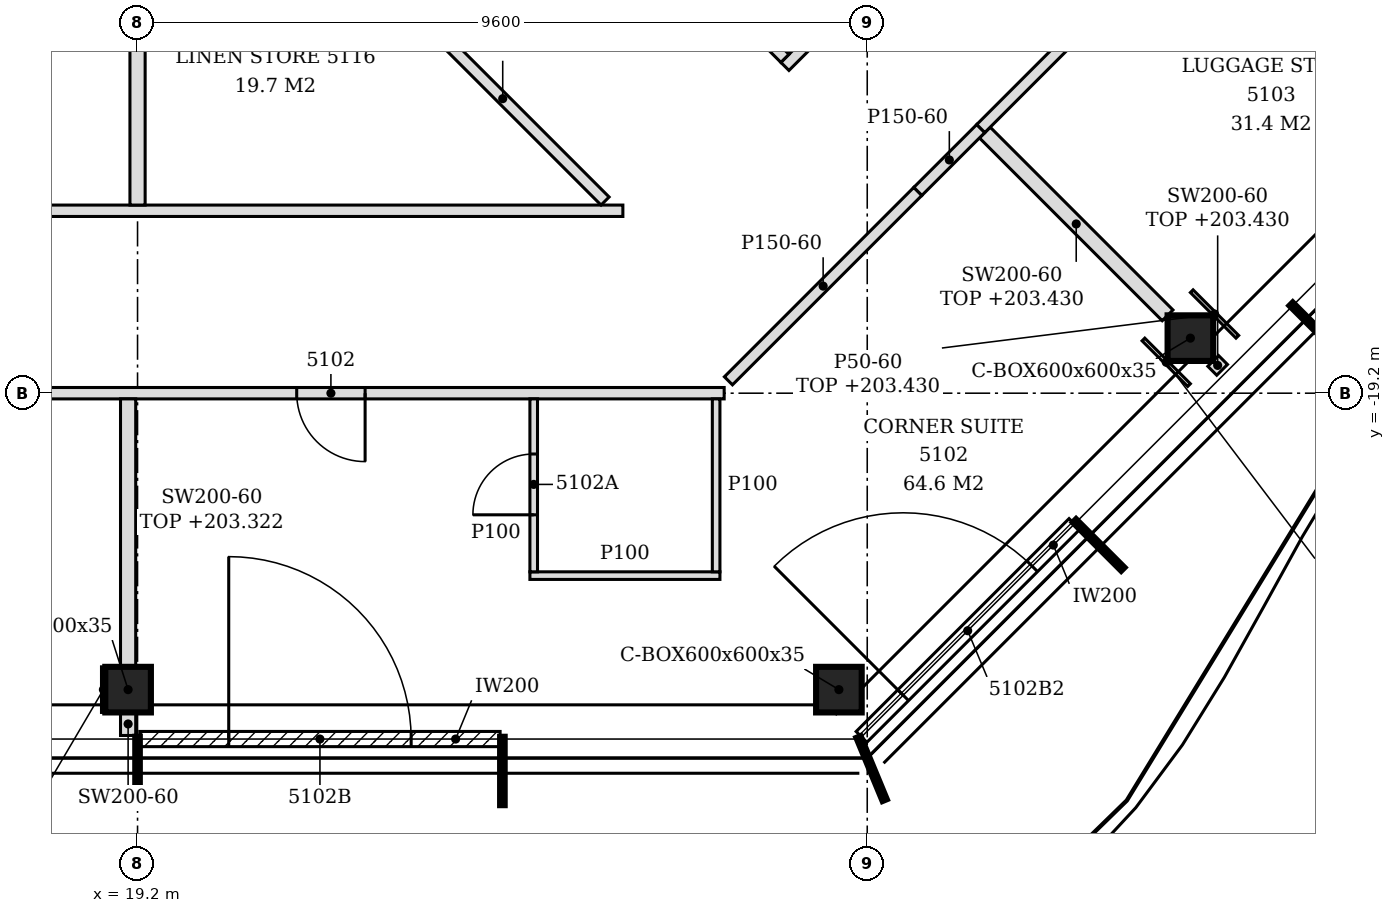
"""IFC4 building model, lengths in metres.
Left out: names, types, materials, properties, quantities, classifications, styles, units other than length and angle.
Written with IfcOpenShell. Run it as: python <this file> out.ifc"""

import sys

from ifc_helpers import new_model, si_unit, direction, frame, frame_2d, origin, origin_2d, place, context, subcontext, project, spatial, polyline, rectangle, hollow_rectangle, outline, extrude, clip, halfspace, element, fill, save


model = new_model("IFC4")
c1 = context("Model", 3, precision=1e-05, world=origin(), true_north=direction((0.0, 1.0)))
c2 = subcontext(c1, "Body", "Model", "MODEL_VIEW")
j1 = project(units=[si_unit("LENGTHUNIT", "METRE"), si_unit("PLANEANGLEUNIT", "RADIAN")], contexts=[c1])
p1 = place(None, origin())
s1 = spatial("IfcSite", under=j1, at=p1, CompositionType="ELEMENT")
p2 = place(p1, origin())
s2 = spatial("IfcBuilding", under=s1, at=p2, CompositionType="ELEMENT")
p3 = place(p2, frame((0.0, 0.0, 201.0)))
s3 = spatial("IfcBuildingStorey", under=s2, at=p3, CompositionType="ELEMENT", Elevation=201.0)
for number, where, z_axis, x_axis in (
    (1, (19.076, -23.1, -0.15), (0.0, 0.0, 1.0), (1.0, 0.0, 0.0)),
    (2, (28.427, -23.1, -0.15), (0.0, 0.0, 1.0), (1.0, 0.0, 0.0)),
    (3, (33.052, -18.476, -0.15), (0.0, 0.0, 1.0), (1.0, 0.0, 0.0)),
):
    element("IfcColumn", number, at=place(p3, frame(where, z_axis=z_axis, x_axis=x_axis)), inside=s3, PredefinedType="COLUMN", context=c2, shape_type="Clipping", body=[
        clip(clip(extrude(hollow_rectangle(XDim=0.6, YDim=0.6, WallThickness=0.035, at=origin_2d()), origin(), (0.0, 0.0, 1.0), 3.5), halfspace(frame((0.0, 0.0, 0.011), z_axis=(0.0, 0.0, 1.0), x_axis=(1.0, 0.0, 0.0)), True)), halfspace(frame((0.0, 0.0, 3.095), z_axis=(0.0, 0.0, 1.0), x_axis=(1.0, 0.0, 0.0)), False)),
    ])
p4 = place(p3, frame((19.23, -23.75, 0.0), z_axis=(0.0, 0.0, 1.0), x_axis=(1.0, 0.0, 0.0)))
e4 = element("IfcWall", 4, at=p4, inside=s3, PredefinedType="NOTDEFINED", context=c2, shape_type="SweptSolid", body=[
    extrude(rectangle(XDim=4.74, YDim=0.2, at=frame_2d((2.37, 0.0))), origin(), (0.0, 0.0, 1.0), 3.35),
])
p5 = place(p4, frame((1.17, 0.0, 0.0)))
e5 = element("IfcOpeningElement", 5, at=p5, cuts=e4, PredefinedType="OPENING", context=c2, shape_type="SweptSolid", body=[
    extrude(rectangle(XDim=2.4, YDim=2.4, at=frame_2d((1.2, 1.2))), frame((0.0, 0.11, 0.0), z_axis=(0.0, -1.0, 0.0), x_axis=(1.0, 0.0, 0.0)), (0.0, 0.0, 1.0), 0.22),
])
p6 = place(p3, frame((28.725, -23.722, 0.0), z_axis=(0.0, 0.0, 1.0), x_axis=(0.707106781187, 0.707106781187, 0.0)))
e6 = element("IfcWall", 6, at=p6, inside=s3, PredefinedType="NOTDEFINED", context=c2, shape_type="SweptSolid", body=[
    extrude(rectangle(XDim=3.962, YDim=0.2, at=frame_2d((1.981, 0.0))), origin(), (0.0, 0.0, 1.0), 3.35),
])
p7 = place(p6, frame((0.775, 0.0, 0.0)))
e7 = element("IfcOpeningElement", 7, at=p7, cuts=e6, PredefinedType="OPENING", context=c2, shape_type="SweptSolid", body=[
    extrude(rectangle(XDim=2.4, YDim=2.4, at=frame_2d((1.2, 1.2))), frame((0.0, 0.11, 0.0), z_axis=(0.0, -1.0, 0.0), x_axis=(1.0, 0.0, 0.0)), (0.0, 0.0, 1.0), 0.22),
])
p8 = place(p3, frame((19.076, -23.703, 0.0), z_axis=(0.0, 0.0, 1.0), x_axis=(0.0, 1.0, 0.0)))
e8 = element("IfcWall", 8, at=p8, inside=s3, PredefinedType="PARTITIONING", context=c2, shape_type="SweptSolid", body=[
    extrude(outline(polyline([(0.0, 0.0), (0.303, 0.0), (0.303, 2.43), (0.153, 2.43), (0.151, 3.35), (0.0, 3.35), (0.0, 0.0)])), frame((0.0, 0.1, 0.0), z_axis=(0.0, -1.0, 0.0), x_axis=(1.0, 0.0, 0.0)), (0.0, 0.0, 1.0), 0.2),
])
p9 = place(p3, frame((19.076, -22.8, 0.0), z_axis=(0.0, 0.0, 1.0), x_axis=(0.0, 1.0, 0.0)))
e9 = element("IfcWall", 9, at=p9, inside=s3, PredefinedType="PARTITIONING", context=c2, shape_type="SweptSolid", body=[
    extrude(rectangle(XDim=3.525, YDim=0.2, at=frame_2d((1.763, 0.0))), origin(), (0.0, 0.0, 1.0), 2.322),
])
p10 = place(p3, frame((24.362, -21.6, 0.0), z_axis=(0.0, 0.0, 1.0), x_axis=(1.0, 0.0, 0.0)))
e10 = element("IfcWall", 10, at=p10, inside=s3, PredefinedType="PARTITIONING", context=c2, shape_type="SweptSolid", body=[
    extrude(rectangle(XDim=2.5, YDim=0.1, at=frame_2d((1.25, 0.0))), origin(), (0.0, 0.0, 1.0), 3.35),
])
p11 = place(p3, frame((24.412, -21.55, 0.0), z_axis=(0.0, 0.0, 1.0), x_axis=(0.0, 1.0, 0.0)))
e11 = element("IfcWall", 11, at=p11, inside=s3, PredefinedType="PARTITIONING", context=c2, shape_type="SweptSolid", body=[
    extrude(outline(polyline([(0.0, 0.0), (2.275, 0.0), (2.275, 2.78), (2.245, 2.78), (2.243, 3.35), (0.0, 3.35), (0.0, 0.0)])), frame((0.0, 0.05, 0.0), z_axis=(0.0, -1.0, 0.0), x_axis=(1.0, 0.0, 0.0)), (0.0, 0.0, 1.0), 0.1),
])
p12 = place(p11, frame((0.75, 0.0, 0.0)))
e12 = element("IfcOpeningElement", 12, at=p12, cuts=e11, PredefinedType="OPENING", context=c2, shape_type="SweptSolid", body=[
    extrude(rectangle(XDim=0.8, YDim=2.1, at=frame_2d((0.4, 1.05))), frame((0.0, 0.06, 0.0), z_axis=(0.0, -1.0, 0.0), x_axis=(1.0, 0.0, 0.0)), (0.0, 0.0, 1.0), 0.12),
])
p13 = place(p3, frame((26.812, -21.55, 0.0), z_axis=(0.0, 0.0, 1.0), x_axis=(0.0, 1.0, 0.0)))
e13 = element("IfcWall", 13, at=p13, inside=s3, PredefinedType="PARTITIONING", context=c2, shape_type="SweptSolid", body=[
    extrude(outline(polyline([(0.0, 0.0), (2.275, 0.0), (2.275, 2.78), (2.245, 2.78), (2.243, 3.35), (0.0, 3.35), (0.0, 0.0)])), frame((0.0, 0.05, 0.0), z_axis=(0.0, -1.0, 0.0), x_axis=(1.0, 0.0, 0.0)), (0.0, 0.0, 1.0), 0.1),
])
p14 = place(p3, frame((2.5, -19.2, 0.0), z_axis=(0.0, 0.0, 1.0), x_axis=(1.0, 0.0, 0.0)))
e14 = element("IfcWall", 14, at=p14, inside=s3, PredefinedType="PARTITIONING", context=c2, shape_type="SweptSolid", body=[
    extrude(outline(polyline([(0.0, 0.0), (24.418, 0.0), (24.418, 2.78), (16.851, 2.78), (16.849, 2.322), (16.549, 2.322), (16.547, 2.78), (4.85, 2.78), (4.848, 2.63), (4.55, 2.63), (4.548, 2.78), (0.0, 2.78), (0.0, 0.0)])), frame((0.0, 0.075, 0.0), z_axis=(0.0, -1.0, 0.0), x_axis=(1.0, 0.0, 0.0)), (0.0, 0.0, 1.0), 0.15),
])
p15 = place(p14, frame((11.45, 0.0, 0.0)))
e15 = element("IfcOpeningElement", 15, at=p15, cuts=e14, PredefinedType="OPENING", context=c2, shape_type="SweptSolid", body=[
    extrude(rectangle(XDim=0.9, YDim=2.1, at=frame_2d((0.45, 1.05))), frame((0.0, 0.085, 0.0), z_axis=(0.0, -1.0, 0.0), x_axis=(1.0, 0.0, 0.0)), (0.0, 0.0, 1.0), 0.17),
])
p16 = place(p14, frame((18.794, 0.0, 0.0)))
e16 = element("IfcOpeningElement", 16, at=p16, cuts=e14, PredefinedType="OPENING", context=c2, shape_type="SweptSolid", body=[
    extrude(rectangle(XDim=0.9, YDim=2.1, at=frame_2d((0.45, 1.05))), frame((0.0, 0.085, 0.0), z_axis=(0.0, -1.0, 0.0), x_axis=(1.0, 0.0, 0.0)), (0.0, 0.0, 1.0), 0.17),
])
p17 = place(p3, frame((26.974, -19.037, 0.0), z_axis=(0.0, 0.0, 1.0), x_axis=(0.707106781187, 0.707106781187, 0.0)))
e17 = element("IfcWall", 17, at=p17, inside=s3, PredefinedType="PARTITIONING", context=c2, shape_type="SweptSolid", body=[
    extrude(rectangle(XDim=3.524, YDim=0.15, at=frame_2d((1.762, 0.0))), origin(), (0.0, 0.0, 1.0), 3.35),
])
p18 = place(p3, frame((33.469, -18.893, 0.0), z_axis=(0.0, 0.0, 1.0), x_axis=(-0.707106781187, 0.707106781187, 0.0)))
e18 = element("IfcWall", 18, at=p18, inside=s3, PredefinedType="PARTITIONING", context=c2, shape_type="SweptSolid", body=[
    extrude(rectangle(XDim=0.166, YDim=0.2, at=frame_2d((0.083, 0.0))), origin(), (0.0, 0.0, 1.0), 2.43),
])
p19 = place(p3, frame((32.752, -18.176, 0.0), z_axis=(0.0, 0.0, 1.0), x_axis=(-0.707106781187, 0.707106781187, 0.0)))
e19 = element("IfcWall", 19, at=p19, inside=s3, PredefinedType="PARTITIONING", context=c2, shape_type="SweptSolid", body=[
    extrude(rectangle(XDim=3.401, YDim=0.2, at=frame_2d((1.7, 0.0))), origin(), (0.0, 0.0, 1.0), 2.43),
])
p20 = place(p3, frame((7.125, -16.8, 0.0), z_axis=(0.0, 0.0, 1.0), x_axis=(1.0, 0.0, 0.0)))
e20 = element("IfcWall", 20, at=p20, inside=s3, PredefinedType="PARTITIONING", context=c2, shape_type="SweptSolid", body=[
    extrude(outline(polyline([(0.0, 0.0), (18.46, 0.0), (18.46, 3.35), (12.226, 3.35), (12.224, 2.322), (11.924, 2.322), (11.922, 3.35), (0.225, 3.35), (0.223, 2.63), (0.0, 2.63), (0.0, 0.0)])), frame((0.0, 0.075, 0.0), z_axis=(0.0, -1.0, 0.0), x_axis=(1.0, 0.0, 0.0)), (0.0, 0.0, 1.0), 0.15),
])
p21 = place(p3, frame((19.2, -16.725, 0.0), z_axis=(0.0, 0.0, 1.0), x_axis=(0.0, 1.0, 0.0)))
e21 = element("IfcWall", 21, at=p21, inside=s3, PredefinedType="PARTITIONING", context=c2, shape_type="SweptSolid", body=[
    extrude(rectangle(XDim=6.321, YDim=0.2, at=frame_2d((3.16, 0.0))), origin(), (0.0, 0.0, 1.0), 2.322),
])
p22 = place(p3, frame((25.351, -16.672, 0.0), z_axis=(0.0, 0.0, 1.0), x_axis=(-0.707106781187, 0.707106781187, 0.0)))
e22 = element("IfcWall", 22, at=p22, inside=s3, PredefinedType="PARTITIONING", context=c2, shape_type="SweptSolid", body=[
    extrude(rectangle(XDim=8.482, YDim=0.15, at=frame_2d((4.241, 0.0))), origin(), (0.0, 0.0, 1.0), 2.322),
])
p23 = place(p22, frame((3.809, 0.0, 0.0)))
e23 = element("IfcOpeningElement", 23, at=p23, cuts=e22, PredefinedType="OPENING", context=c2, shape_type="SweptSolid", body=[
    extrude(rectangle(XDim=0.9, YDim=2.1, at=frame_2d((0.45, 1.05))), frame((0.0, 0.085, 0.0), z_axis=(0.0, -1.0, 0.0), x_axis=(1.0, 0.0, 0.0)), (0.0, 0.0, 1.0), 0.17),
])
p24 = place(p3, frame((29.466, -16.545, 0.0), z_axis=(0.0, 0.0, 1.0), x_axis=(0.70752395322, 0.706689362889, 0.0)))
e24 = element("IfcWall", 24, at=p24, inside=s3, PredefinedType="PARTITIONING", context=c2, shape_type="SweptSolid", body=[
    extrude(rectangle(XDim=1.17, YDim=0.15, at=frame_2d((0.585, 0.0))), origin(), (0.0, 0.0, 1.0), 3.35),
])
p25 = place(p3, frame((30.294, -15.718, 0.0), z_axis=(0.0, 0.0, 1.0), x_axis=(0.707117331948, 0.707096230267, 0.0)))
e25 = element("IfcWall", 25, at=p25, inside=s3, PredefinedType="PARTITIONING", context=c2, shape_type="SweptSolid", body=[
    extrude(rectangle(XDim=11.57, YDim=0.15, at=frame_2d((5.785, 0.0))), origin(), (0.0, 0.0, 1.0), 2.43),
])
p26 = place(p25, frame((2.819, 0.0, 0.0)))
e26 = element("IfcOpeningElement", 26, at=p26, cuts=e25, PredefinedType="OPENING", context=c2, shape_type="SweptSolid", body=[
    extrude(rectangle(XDim=0.9, YDim=2.1, at=frame_2d((0.45, 1.05))), frame((0.0, 0.085, 0.0), z_axis=(0.0, -1.0, 0.0), x_axis=(1.0, 0.0, 0.0)), (0.0, 0.0, 1.0), 0.17),
])
p27 = place(p3, frame((27.717, -14.901, 0.0), z_axis=(0.0, 0.0, 1.0), x_axis=(0.707106781187, 0.707106781187, 0.0)))
e27 = element("IfcWall", 27, at=p27, inside=s3, PredefinedType="PARTITIONING", context=c2, shape_type="SweptSolid", body=[
    extrude(rectangle(XDim=5.031, YDim=0.15, at=frame_2d((2.516, 0.0))), origin(), (0.0, 0.0, 1.0), 2.73),
])
p28 = place(p3, frame((27.717, -14.795, 0.0), z_axis=(0.0, 0.0, 1.0), x_axis=(-0.707175638903, 0.707037916764, 0.0)))
e28 = element("IfcWall", 28, at=p28, inside=s3, PredefinedType="PARTITIONING", context=c2, shape_type="SweptSolid", body=[
    extrude(rectangle(XDim=8.864, YDim=0.15, at=frame_2d((4.432, 0.0))), origin(), (0.0, 0.0, 1.0), 2.43),
])
p29 = place(p3, frame((18.751, -23.4, 0.0), z_axis=(0.0, 0.0, 1.0), x_axis=(0.0, 1.0, 0.0)))
e29 = element("IfcWall", 29, at=p29, inside=s3, PredefinedType="PARTITIONING", context=c2, shape_type="SweptSolid", body=[
    extrude(rectangle(XDim=0.6, YDim=0.05, at=frame_2d((0.3, 0.0))), origin(), (0.0, 0.0, 1.0), 2.43),
])
p30 = place(p3, frame((33.034, -19.094, 0.0), z_axis=(0.0, 0.0, 1.0), x_axis=(-0.706962899457, 0.707250633645, 0.0)))
e30 = element("IfcWall", 30, at=p30, inside=s3, PredefinedType="PARTITIONING", context=c2, shape_type="SweptSolid", body=[
    extrude(rectangle(XDim=0.848, YDim=0.05, at=frame_2d((0.424, 0.0))), origin(), (0.0, 0.0, 1.0), 2.43),
])
p31 = place(p3, frame((33.669, -18.458, 0.0), z_axis=(0.0, 0.0, 1.0), x_axis=(-0.707106781187, 0.707106781187, 0.0)))
e31 = element("IfcWall", 31, at=p31, inside=s3, PredefinedType="PARTITIONING", context=c2, shape_type="SweptSolid", body=[
    extrude(rectangle(XDim=0.849, YDim=0.05, at=frame_2d((0.424, 0.0))), origin(), (0.0, 0.0, 1.0), 2.43),
])
p32 = place(p5, origin())
e32 = element("IfcDoor", 32, at=p32, inside=s3, OperationType="SINGLE_SWING_LEFT", PredefinedType="DOOR", context=c2, shape_type="SweptSolid", body=[
    extrude(rectangle(XDim=2.4, YDim=2.4, at=frame_2d((1.2, 1.2))), frame((0.0, 0.025, 0.0), z_axis=(0.0, -1.0, 0.0), x_axis=(1.0, 0.0, 0.0)), (0.0, 0.0, 1.0), 0.05),
])
fill(e5, e32)
p33 = place(p7, origin())
e33 = element("IfcDoor", 33, at=p33, inside=s3, OperationType="SINGLE_SWING_LEFT", PredefinedType="DOOR", context=c2, shape_type="SweptSolid", body=[
    extrude(rectangle(XDim=2.4, YDim=2.4, at=frame_2d((1.2, 1.2))), frame((0.0, 0.025, 0.0), z_axis=(0.0, -1.0, 0.0), x_axis=(1.0, 0.0, 0.0)), (0.0, 0.0, 1.0), 0.05),
])
fill(e7, e33)
p34 = place(p16, frame((0.9, 0.0, 0.0), z_axis=(0.0, 0.0, 1.0), x_axis=(-1.0, 0.0, 0.0)))
e34 = element("IfcDoor", 34, at=p34, inside=s3, OperationType="SINGLE_SWING_LEFT", PredefinedType="DOOR", context=c2, shape_type="SweptSolid", body=[
    extrude(rectangle(XDim=0.9, YDim=2.1, at=frame_2d((0.45, 1.05))), frame((0.0, 0.025, 0.0), z_axis=(0.0, -1.0, 0.0), x_axis=(1.0, 0.0, 0.0)), (0.0, 0.0, 1.0), 0.05),
])
fill(e16, e34)
p35 = place(p12, origin())
e35 = element("IfcDoor", 35, at=p35, inside=s3, OperationType="SINGLE_SWING_LEFT", PredefinedType="DOOR", context=c2, shape_type="SweptSolid", body=[
    extrude(rectangle(XDim=0.8, YDim=2.1, at=frame_2d((0.4, 1.05))), frame((0.0, 0.025, 0.0), z_axis=(0.0, -1.0, 0.0), x_axis=(1.0, 0.0, 0.0)), (0.0, 0.0, 1.0), 0.05),
])
fill(e12, e35)
save(model, sys.argv[1])
